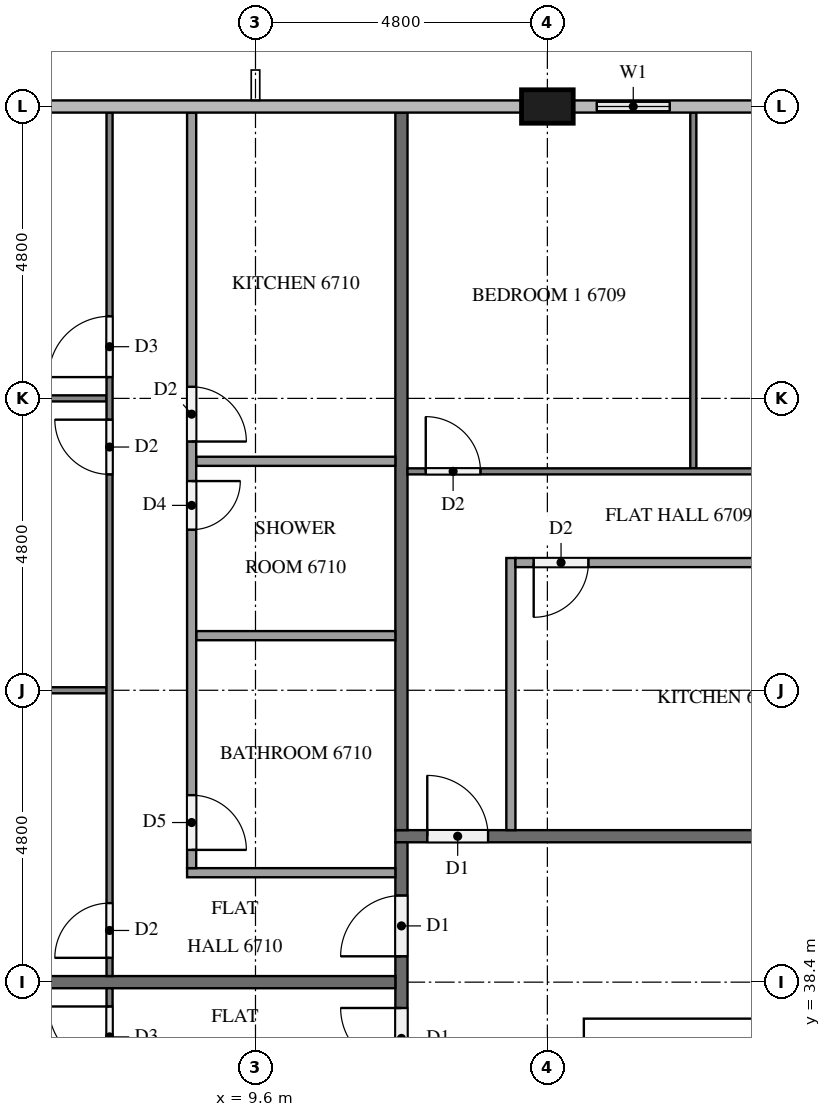
"""IFC4 building model, lengths in metres.
Left out: names, types, materials, properties, quantities, classifications, styles, units other than length and angle.
Written with IfcOpenShell. Run it as: python <this file> out.ifc"""

import sys

from ifc_helpers import new_model, si_unit, direction, frame, frame_2d, origin, origin_2d, place, context, subcontext, project, spatial, rectangle, extrude, element, fill, save


model = new_model("IFC4")
c1 = context("Model", 3, precision=1e-05, world=origin(), true_north=direction((0.0, 1.0)))
c2 = subcontext(c1, "Body", "Model", "MODEL_VIEW")
j1 = project(units=[si_unit("LENGTHUNIT", "METRE"), si_unit("PLANEANGLEUNIT", "RADIAN")], contexts=[c1])
p1 = place(None, origin())
s1 = spatial("IfcSite", under=j1, at=p1, CompositionType="ELEMENT")
p2 = place(p1, origin())
s2 = spatial("IfcBuilding", under=s1, at=p2, CompositionType="ELEMENT")
p3 = place(p2, frame((0.0, 0.0, 256.2)))
s3 = spatial("IfcBuildingStorey", under=s2, at=p3, CompositionType="ELEMENT", Elevation=256.2)
p4 = place(p3, frame((15.0, 37.5, 0.0), z_axis=(0.0, 0.0, 1.0), x_axis=(1.0, 0.0, 0.0)))
e1 = element("IfcWall", 1, at=p4, inside=s3, PredefinedType="SHEAR", context=c2, shape_type="SweptSolid", body=[
    extrude(rectangle(XDim=32.4, YDim=0.6, at=frame_2d((16.2, 0.0))), origin(), (0.0, 0.0, 1.0), 3.2),
])
p5 = place(p4, frame((15.3, 0.0, 0.0)))
e2 = element("IfcOpeningElement", 2, at=p5, cuts=e1, PredefinedType="OPENING", context=c2, shape_type="SweptSolid", body=[
    extrude(rectangle(XDim=1.8, YDim=2.1, at=frame_2d((0.9, 1.05))), frame((0.0, 0.31, 0.0), z_axis=(0.0, -1.0, 0.0), x_axis=(1.0, 0.0, 0.0)), (0.0, 0.0, 1.0), 0.62),
])
p6 = place(p4, frame((1.25, 0.0, 0.0)))
e3 = element("IfcOpeningElement", 3, at=p6, cuts=e1, PredefinedType="OPENING", context=c2, shape_type="SweptSolid", body=[
    extrude(rectangle(XDim=1.0, YDim=2.1, at=frame_2d((0.5, 1.05))), frame((0.0, 0.31, 0.0), z_axis=(0.0, -1.0, 0.0), x_axis=(1.0, 0.0, 0.0)), (0.0, 0.0, 1.0), 0.62),
])
p7 = place(p4, frame((4.988, 0.0, 0.0)))
e4 = element("IfcOpeningElement", 4, at=p7, cuts=e1, PredefinedType="OPENING", context=c2, shape_type="SweptSolid", body=[
    extrude(rectangle(XDim=1.0, YDim=2.1, at=frame_2d((0.5, 1.05))), frame((0.0, 0.31, 0.0), z_axis=(0.0, -1.0, 0.0), x_axis=(1.0, 0.0, 0.0)), (0.0, 0.0, 1.0), 0.62),
])
p8 = place(p3, frame((14.4, 52.8, 0.0), z_axis=(0.0, 0.0, 1.0), x_axis=(1.0, 0.0, 0.0)))
e5 = element("IfcColumn", 5, at=p8, inside=s3, PredefinedType="COLUMN", context=c2, shape_type="SweptSolid", body=[
    extrude(rectangle(XDim=0.85, YDim=0.55, at=origin_2d()), origin(), (0.0, 0.0, 1.0), 3.2),
])
p9 = place(p3, frame((16.8, 52.8, 0.0), z_axis=(0.0, 0.0, 1.0), x_axis=(-1.0, 0.0, 0.0)))
e6 = element("IfcWall", 6, at=p9, inside=s3, PredefinedType="SOLIDWALL", context=c2, shape_type="SweptSolid", body=[
    extrude(rectangle(XDim=1.975, YDim=0.15, at=frame_2d((0.988, 0.0))), origin(), (0.0, 0.0, 1.0), 3.2),
])
p10 = place(p9, frame((0.387, 0.0, 0.9)))
e7 = element("IfcOpeningElement", 7, at=p10, cuts=e6, PredefinedType="OPENING", context=c2, shape_type="SweptSolid", body=[
    extrude(rectangle(XDim=1.2, YDim=1.4, at=frame_2d((0.6, 0.7))), frame((0.0, 0.085, 0.0), z_axis=(0.0, -1.0, 0.0), x_axis=(1.0, 0.0, 0.0)), (0.0, 0.0, 1.0), 0.17),
])
p11 = place(p3, frame((11.9, 40.8, 0.0), z_axis=(0.0, 0.0, 1.0), x_axis=(1.0, 0.0, 0.0)))
e8 = element("IfcWall", 8, at=p11, inside=s3, PredefinedType="PARTITIONING", context=c2, shape_type="SweptSolid", body=[
    extrude(rectangle(XDim=38.6, YDim=0.2, at=frame_2d((19.3, 0.0))), origin(), (0.0, 0.0, 1.0), 3.2),
])
p12 = place(p11, frame((31.725, 0.0, 0.0)))
e9 = element("IfcOpeningElement", 9, at=p12, cuts=e8, PredefinedType="OPENING", context=c2, shape_type="SweptSolid", body=[
    extrude(rectangle(XDim=1.0, YDim=2.1, at=frame_2d((0.5, 1.05))), frame((0.0, 0.11, 0.0), z_axis=(0.0, -1.0, 0.0), x_axis=(1.0, 0.0, 0.0)), (0.0, 0.0, 1.0), 0.22),
])
p13 = place(p11, frame((17.325, 0.0, 0.0)))
e10 = element("IfcOpeningElement", 10, at=p13, cuts=e8, PredefinedType="OPENING", context=c2, shape_type="SweptSolid", body=[
    extrude(rectangle(XDim=1.0, YDim=2.1, at=frame_2d((0.5, 1.05))), frame((0.0, 0.11, 0.0), z_axis=(0.0, -1.0, 0.0), x_axis=(1.0, 0.0, 0.0)), (0.0, 0.0, 1.0), 0.22),
])
p14 = place(p11, frame((0.525, 0.0, 0.0)))
e11 = element("IfcOpeningElement", 11, at=p14, cuts=e8, PredefinedType="OPENING", context=c2, shape_type="SweptSolid", body=[
    extrude(rectangle(XDim=1.0, YDim=2.1, at=frame_2d((0.5, 1.05))), frame((0.0, 0.11, 0.0), z_axis=(0.0, -1.0, 0.0), x_axis=(1.0, 0.0, 0.0)), (0.0, 0.0, 1.0), 0.22),
])
p15 = place(p3, frame((12.0, 12.1, 0.0), z_axis=(0.0, 0.0, 1.0), x_axis=(0.0, 1.0, 0.0)))
e12 = element("IfcWall", 12, at=p15, inside=s3, PredefinedType="PARTITIONING", context=c2, shape_type="SweptSolid", body=[
    extrude(rectangle(XDim=28.6, YDim=0.2, at=frame_2d((14.3, 0.0))), origin(), (0.0, 0.0, 1.0), 3.2),
])
p16 = place(p15, frame((26.725, 0.0, 0.0)))
e13 = element("IfcOpeningElement", 13, at=p16, cuts=e12, PredefinedType="OPENING", context=c2, shape_type="SweptSolid", body=[
    extrude(rectangle(XDim=1.0, YDim=2.1, at=frame_2d((0.5, 1.05))), frame((0.0, 0.11, 0.0), z_axis=(0.0, -1.0, 0.0), x_axis=(1.0, 0.0, 0.0)), (0.0, 0.0, 1.0), 0.22),
])
p17 = place(p15, frame((24.875, 0.0, 0.0)))
e14 = element("IfcOpeningElement", 14, at=p17, cuts=e12, PredefinedType="OPENING", context=c2, shape_type="SweptSolid", body=[
    extrude(rectangle(XDim=1.0, YDim=2.1, at=frame_2d((0.5, 1.05))), frame((0.0, 0.11, 0.0), z_axis=(0.0, -1.0, 0.0), x_axis=(1.0, 0.0, 0.0)), (0.0, 0.0, 1.0), 0.22),
])
p18 = place(p15, frame((17.675, 0.0, 0.0)))
e15 = element("IfcOpeningElement", 15, at=p18, cuts=e12, PredefinedType="OPENING", context=c2, shape_type="SweptSolid", body=[
    extrude(rectangle(XDim=1.0, YDim=2.1, at=frame_2d((0.5, 1.05))), frame((0.0, 0.11, 0.0), z_axis=(0.0, -1.0, 0.0), x_axis=(1.0, 0.0, 0.0)), (0.0, 0.0, 1.0), 0.22),
])
p19 = place(p15, frame((2.725, 0.0, 0.0)))
e16 = element("IfcOpeningElement", 16, at=p19, cuts=e12, PredefinedType="OPENING", context=c2, shape_type="SweptSolid", body=[
    extrude(rectangle(XDim=1.0, YDim=2.1, at=frame_2d((0.5, 1.05))), frame((0.0, 0.11, 0.0), z_axis=(0.0, -1.0, 0.0), x_axis=(1.0, 0.0, 0.0)), (0.0, 0.0, 1.0), 0.22),
])
p20 = place(p15, frame((0.875, 0.0, 0.0)))
e17 = element("IfcOpeningElement", 17, at=p20, cuts=e12, PredefinedType="OPENING", context=c2, shape_type="SweptSolid", body=[
    extrude(rectangle(XDim=1.0, YDim=2.1, at=frame_2d((0.5, 1.05))), frame((0.0, 0.11, 0.0), z_axis=(0.0, -1.0, 0.0), x_axis=(1.0, 0.0, 0.0)), (0.0, 0.0, 1.0), 0.22),
])
p21 = place(p3, frame((12.0, 52.7, 0.0), z_axis=(0.0, 0.0, 1.0), x_axis=(0.0, -1.0, 0.0)))
e18 = element("IfcWall", 18, at=p21, inside=s3, PredefinedType="PARTITIONING", context=c2, shape_type="SweptSolid", body=[
    extrude(rectangle(XDim=11.8, YDim=0.2, at=frame_2d((5.9, 0.0))), origin(), (0.0, 0.0, 1.0), 3.2),
])
p22 = place(p3, frame((0.275, 38.4, 0.0), z_axis=(0.0, 0.0, 1.0), x_axis=(1.0, 0.0, 0.0)))
e19 = element("IfcWall", 19, at=p22, inside=s3, PredefinedType="PARTITIONING", context=c2, shape_type="SweptSolid", body=[
    extrude(rectangle(XDim=11.625, YDim=0.2, at=frame_2d((5.812, 0.0))), origin(), (0.0, 0.0, 1.0), 3.2),
])
p23 = place(p3, frame((16.8, 46.85, 0.0), z_axis=(0.0, 0.0, 1.0), x_axis=(0.0, 1.0, 0.0)))
e20 = element("IfcWall", 20, at=p23, inside=s3, PredefinedType="PARTITIONING", context=c2, shape_type="SweptSolid", body=[
    extrude(rectangle(XDim=5.85, YDim=0.1, at=frame_2d((2.925, 0.0))), origin(), (0.0, 0.0, 1.0), 3.2),
])
p24 = place(p3, frame((12.1, 46.8, 0.0), z_axis=(0.0, 0.0, 1.0), x_axis=(1.0, 0.0, 0.0)))
e21 = element("IfcWall", 21, at=p24, inside=s3, PredefinedType="PARTITIONING", context=c2, shape_type="SweptSolid", body=[
    extrude(rectangle(XDim=16.6, YDim=0.1, at=frame_2d((8.3, 0.0))), origin(), (0.0, 0.0, 1.0), 3.2),
])
p25 = place(p24, frame((0.3, 0.0, 0.0)))
e22 = element("IfcOpeningElement", 22, at=p25, cuts=e21, PredefinedType="OPENING", context=c2, shape_type="SweptSolid", body=[
    extrude(rectangle(XDim=0.9, YDim=2.1, at=frame_2d((0.45, 1.05))), frame((0.0, 0.06, 0.0), z_axis=(0.0, -1.0, 0.0), x_axis=(1.0, 0.0, 0.0)), (0.0, 0.0, 1.0), 0.12),
])
p26 = place(p24, frame((8.25, 0.0, 0.0)))
e23 = element("IfcOpeningElement", 23, at=p26, cuts=e21, PredefinedType="OPENING", context=c2, shape_type="SweptSolid", body=[
    extrude(rectangle(XDim=0.9, YDim=2.1, at=frame_2d((0.45, 1.05))), frame((0.0, 0.06, 0.0), z_axis=(0.0, -1.0, 0.0), x_axis=(1.0, 0.0, 0.0)), (0.0, 0.0, 1.0), 0.12),
])
p27 = place(p24, frame((9.85, 0.0, 0.0)))
e24 = element("IfcOpeningElement", 24, at=p27, cuts=e21, PredefinedType="OPENING", context=c2, shape_type="SweptSolid", body=[
    extrude(rectangle(XDim=1.0, YDim=2.1, at=frame_2d((0.5, 1.05))), frame((0.0, 0.06, 0.0), z_axis=(0.0, -1.0, 0.0), x_axis=(1.0, 0.0, 0.0)), (0.0, 0.0, 1.0), 0.12),
])
p28 = place(p3, frame((13.8, 40.9, 0.0), z_axis=(0.0, 0.0, 1.0), x_axis=(0.0, 1.0, 0.0)))
e25 = element("IfcWall", 25, at=p28, inside=s3, PredefinedType="PARTITIONING", context=c2, shape_type="SweptSolid", body=[
    extrude(rectangle(XDim=4.475, YDim=0.15, at=frame_2d((2.238, 0.0))), origin(), (0.0, 0.0, 1.0), 3.2),
])
p29 = place(p3, frame((28.7, 45.3, 0.0), z_axis=(0.0, 0.0, 1.0), x_axis=(-1.0, 0.0, 0.0)))
e26 = element("IfcWall", 26, at=p29, inside=s3, PredefinedType="PARTITIONING", context=c2, shape_type="SweptSolid", body=[
    extrude(rectangle(XDim=14.825, YDim=0.15, at=frame_2d((7.413, 0.0))), origin(), (0.0, 0.0, 1.0), 3.2),
])
p30 = place(p29, frame((13.625, 0.0, 0.0)))
e27 = element("IfcOpeningElement", 27, at=p30, cuts=e26, PredefinedType="OPENING", context=c2, shape_type="SweptSolid", body=[
    extrude(rectangle(XDim=0.9, YDim=2.1, at=frame_2d((0.45, 1.05))), frame((0.0, 0.085, 0.0), z_axis=(0.0, -1.0, 0.0), x_axis=(1.0, 0.0, 0.0)), (0.0, 0.0, 1.0), 0.17),
])
p31 = place(p29, frame((4.886, 0.0, 0.0)))
e28 = element("IfcOpeningElement", 28, at=p31, cuts=e26, PredefinedType="OPENING", context=c2, shape_type="SweptSolid", body=[
    extrude(rectangle(XDim=0.8, YDim=2.1, at=frame_2d((0.4, 1.05))), frame((0.0, 0.085, 0.0), z_axis=(0.0, -1.0, 0.0), x_axis=(1.0, 0.0, 0.0)), (0.0, 0.0, 1.0), 0.17),
])
p32 = place(p29, frame((3.336, 0.0, 0.0)))
e29 = element("IfcOpeningElement", 29, at=p32, cuts=e26, PredefinedType="OPENING", context=c2, shape_type="SweptSolid", body=[
    extrude(rectangle(XDim=0.9, YDim=2.1, at=frame_2d((0.45, 1.05))), frame((0.0, 0.085, 0.0), z_axis=(0.0, -1.0, 0.0), x_axis=(1.0, 0.0, 0.0)), (0.0, 0.0, 1.0), 0.17),
])
p33 = place(p3, frame((7.15, 43.2, 0.0), z_axis=(0.0, 0.0, 1.0), x_axis=(-1.0, 0.0, 0.0)))
e30 = element("IfcWall", 30, at=p33, inside=s3, PredefinedType="PARTITIONING", context=c2, shape_type="SweptSolid", body=[
    extrude(rectangle(XDim=7.05, YDim=0.1, at=frame_2d((3.525, 0.0))), origin(), (0.0, 0.0, 1.0), 3.2),
])
p34 = place(p3, frame((7.15, 48.0, 0.0), z_axis=(0.0, 0.0, 1.0), x_axis=(-1.0, 0.0, 0.0)))
e31 = element("IfcWall", 31, at=p34, inside=s3, PredefinedType="PARTITIONING", context=c2, shape_type="SweptSolid", body=[
    extrude(rectangle(XDim=6.8, YDim=0.1, at=frame_2d((3.4, 0.0))), origin(), (0.0, 0.0, 1.0), 3.2),
])
p35 = place(p3, frame((7.2, 38.5, 0.0), z_axis=(0.0, 0.0, 1.0), x_axis=(0.0, 1.0, 0.0)))
e32 = element("IfcWall", 32, at=p35, inside=s3, PredefinedType="PARTITIONING", context=c2, shape_type="SweptSolid", body=[
    extrude(rectangle(XDim=14.2, YDim=0.1, at=frame_2d((7.1, 0.0))), origin(), (0.0, 0.0, 1.0), 3.2),
])
p36 = place(p35, frame((0.3, 0.0, 0.0)))
e33 = element("IfcOpeningElement", 33, at=p36, cuts=e32, PredefinedType="OPENING", context=c2, shape_type="SweptSolid", body=[
    extrude(rectangle(XDim=0.9, YDim=2.1, at=frame_2d((0.45, 1.05))), frame((0.0, 0.06, 0.0), z_axis=(0.0, -1.0, 0.0), x_axis=(1.0, 0.0, 0.0)), (0.0, 0.0, 1.0), 0.12),
])
p37 = place(p35, frame((8.25, 0.0, 0.0)))
e34 = element("IfcOpeningElement", 34, at=p37, cuts=e32, PredefinedType="OPENING", context=c2, shape_type="SweptSolid", body=[
    extrude(rectangle(XDim=0.9, YDim=2.1, at=frame_2d((0.45, 1.05))), frame((0.0, 0.06, 0.0), z_axis=(0.0, -1.0, 0.0), x_axis=(1.0, 0.0, 0.0)), (0.0, 0.0, 1.0), 0.12),
])
p38 = place(p35, frame((9.85, 0.0, 0.0)))
e35 = element("IfcOpeningElement", 35, at=p38, cuts=e32, PredefinedType="OPENING", context=c2, shape_type="SweptSolid", body=[
    extrude(rectangle(XDim=1.0, YDim=2.1, at=frame_2d((0.5, 1.05))), frame((0.0, 0.06, 0.0), z_axis=(0.0, -1.0, 0.0), x_axis=(1.0, 0.0, 0.0)), (0.0, 0.0, 1.0), 0.12),
])
for number, where, z_axis, x_axis in (
    (36, (11.9, 44.098, 0.0), (0.0, 0.0, 1.0), (-1.0, 0.0, 0.0)),
    (37, (11.9, 46.965, 0.0), (0.0, 0.0, 1.0), (-1.0, 0.0, 0.0)),
):
    element("IfcWall", number, at=place(p3, frame(where, z_axis=z_axis, x_axis=x_axis)), inside=s3, PredefinedType="PARTITIONING", context=c2, shape_type="SweptSolid", body=[
        extrude(rectangle(XDim=3.275, YDim=0.15, at=frame_2d((1.637, 0.0))), origin(), (0.0, 0.0, 1.0), 3.2),
    ])
p39 = place(p3, frame((11.9, 40.2, 0.0), z_axis=(0.0, 0.0, 1.0), x_axis=(-1.0, 0.0, 0.0)))
e38 = element("IfcWall", 38, at=p39, inside=s3, PredefinedType="PARTITIONING", context=c2, shape_type="SweptSolid", body=[
    extrude(rectangle(XDim=3.425, YDim=0.15, at=frame_2d((1.712, 0.0))), origin(), (0.0, 0.0, 1.0), 3.2),
])
p40 = place(p3, frame((8.55, 52.7, 0.0), z_axis=(0.0, 0.0, 1.0), x_axis=(0.0, -1.0, 0.0)))
e39 = element("IfcWall", 39, at=p40, inside=s3, PredefinedType="PARTITIONING", context=c2, shape_type="SweptSolid", body=[
    extrude(rectangle(XDim=12.425, YDim=0.15, at=frame_2d((6.212, 0.0))), origin(), (0.0, 0.0, 1.0), 3.2),
])
p41 = place(p40, frame((11.225, 0.0, 0.0)))
e40 = element("IfcOpeningElement", 40, at=p41, cuts=e39, PredefinedType="OPENING", context=c2, shape_type="SweptSolid", body=[
    extrude(rectangle(XDim=0.9, YDim=2.1, at=frame_2d((0.45, 1.05))), frame((0.0, 0.085, 0.0), z_axis=(0.0, -1.0, 0.0), x_axis=(1.0, 0.0, 0.0)), (0.0, 0.0, 1.0), 0.17),
])
p42 = place(p40, frame((6.06, 0.0, 0.0)))
e41 = element("IfcOpeningElement", 41, at=p42, cuts=e39, PredefinedType="OPENING", context=c2, shape_type="SweptSolid", body=[
    extrude(rectangle(XDim=0.8, YDim=2.1, at=frame_2d((0.4, 1.05))), frame((0.0, 0.085, 0.0), z_axis=(0.0, -1.0, 0.0), x_axis=(1.0, 0.0, 0.0)), (0.0, 0.0, 1.0), 0.17),
])
p43 = place(p40, frame((4.51, 0.0, 0.0)))
e42 = element("IfcOpeningElement", 42, at=p43, cuts=e39, PredefinedType="OPENING", context=c2, shape_type="SweptSolid", body=[
    extrude(rectangle(XDim=0.9, YDim=2.1, at=frame_2d((0.45, 1.05))), frame((0.0, 0.085, 0.0), z_axis=(0.0, -1.0, 0.0), x_axis=(1.0, 0.0, 0.0)), (0.0, 0.0, 1.0), 0.17),
])
p44 = place(p3, frame((7.2, 31.3, 0.0), z_axis=(0.0, 0.0, 1.0), x_axis=(0.0, 1.0, 0.0)))
e43 = element("IfcWall", 43, at=p44, inside=s3, PredefinedType="PARTITIONING", context=c2, shape_type="SweptSolid", body=[
    extrude(rectangle(XDim=7.0, YDim=0.1, at=frame_2d((3.5, 0.0))), origin(), (0.0, 0.0, 1.0), 3.2),
])
p45 = place(p44, frame((5.7, 0.0, 0.0)))
e44 = element("IfcOpeningElement", 44, at=p45, cuts=e43, PredefinedType="OPENING", context=c2, shape_type="SweptSolid", body=[
    extrude(rectangle(XDim=1.0, YDim=2.1, at=frame_2d((0.5, 1.05))), frame((0.0, 0.06, 0.0), z_axis=(0.0, -1.0, 0.0), x_axis=(1.0, 0.0, 0.0)), (0.0, 0.0, 1.0), 0.12),
])
p46 = place(p10, origin())
e45 = element("IfcWindow", 45, at=p46, inside=s3, PartitioningType="SINGLE_PANEL", PredefinedType="WINDOW", context=c2, shape_type="SweptSolid", body=[
    extrude(rectangle(XDim=1.2, YDim=1.4, at=frame_2d((0.6, 0.7))), frame((0.0, 0.03, 0.0), z_axis=(0.0, -1.0, 0.0), x_axis=(1.0, 0.0, 0.0)), (0.0, 0.0, 1.0), 0.06),
])
fill(e7, e45)
p47 = place(p6, origin())
e46 = element("IfcDoor", 46, at=p47, inside=s3, OperationType="SINGLE_SWING_RIGHT", PredefinedType="DOOR", context=c2, shape_type="SweptSolid", body=[
    extrude(rectangle(XDim=1.0, YDim=2.1, at=frame_2d((0.5, 1.05))), frame((0.0, 0.025, 0.0), z_axis=(0.0, -1.0, 0.0), x_axis=(1.0, 0.0, 0.0)), (0.0, 0.0, 1.0), 0.05),
])
fill(e3, e46)
p48 = place(p14, origin())
e47 = element("IfcDoor", 47, at=p48, inside=s3, OperationType="SINGLE_SWING_LEFT", PredefinedType="DOOR", context=c2, shape_type="SweptSolid", body=[
    extrude(rectangle(XDim=1.0, YDim=2.1, at=frame_2d((0.5, 1.05))), frame((0.0, 0.025, 0.0), z_axis=(0.0, -1.0, 0.0), x_axis=(1.0, 0.0, 0.0)), (0.0, 0.0, 1.0), 0.05),
])
fill(e11, e47)
p49 = place(p16, origin())
e48 = element("IfcDoor", 48, at=p49, inside=s3, OperationType="SINGLE_SWING_LEFT", PredefinedType="DOOR", context=c2, shape_type="SweptSolid", body=[
    extrude(rectangle(XDim=1.0, YDim=2.1, at=frame_2d((0.5, 1.05))), frame((0.0, 0.025, 0.0), z_axis=(0.0, -1.0, 0.0), x_axis=(1.0, 0.0, 0.0)), (0.0, 0.0, 1.0), 0.05),
])
fill(e13, e48)
p50 = place(p17, origin())
e49 = element("IfcDoor", 49, at=p50, inside=s3, OperationType="SINGLE_SWING_RIGHT", PredefinedType="DOOR", context=c2, shape_type="SweptSolid", body=[
    extrude(rectangle(XDim=1.0, YDim=2.1, at=frame_2d((0.5, 1.05))), frame((0.0, 0.025, 0.0), z_axis=(0.0, -1.0, 0.0), x_axis=(1.0, 0.0, 0.0)), (0.0, 0.0, 1.0), 0.05),
])
fill(e14, e49)
p51 = place(p25, origin())
e50 = element("IfcDoor", 50, at=p51, inside=s3, OperationType="SINGLE_SWING_LEFT", PredefinedType="DOOR", context=c2, shape_type="SweptSolid", body=[
    extrude(rectangle(XDim=0.9, YDim=2.1, at=frame_2d((0.45, 1.05))), frame((0.0, 0.025, 0.0), z_axis=(0.0, -1.0, 0.0), x_axis=(1.0, 0.0, 0.0)), (0.0, 0.0, 1.0), 0.05),
])
fill(e22, e50)
p52 = place(p30, origin())
e51 = element("IfcDoor", 51, at=p52, inside=s3, OperationType="SINGLE_SWING_RIGHT", PredefinedType="DOOR", context=c2, shape_type="SweptSolid", body=[
    extrude(rectangle(XDim=0.9, YDim=2.1, at=frame_2d((0.45, 1.05))), frame((0.0, 0.025, 0.0), z_axis=(0.0, -1.0, 0.0), x_axis=(1.0, 0.0, 0.0)), (0.0, 0.0, 1.0), 0.05),
])
fill(e27, e51)
p53 = place(p36, origin())
e52 = element("IfcDoor", 52, at=p53, inside=s3, OperationType="SINGLE_SWING_LEFT", PredefinedType="DOOR", context=c2, shape_type="SweptSolid", body=[
    extrude(rectangle(XDim=0.9, YDim=2.1, at=frame_2d((0.45, 1.05))), frame((0.0, 0.025, 0.0), z_axis=(0.0, -1.0, 0.0), x_axis=(1.0, 0.0, 0.0)), (0.0, 0.0, 1.0), 0.05),
])
fill(e33, e52)
p54 = place(p37, origin())
e53 = element("IfcDoor", 53, at=p54, inside=s3, OperationType="SINGLE_SWING_RIGHT", PredefinedType="DOOR", context=c2, shape_type="SweptSolid", body=[
    extrude(rectangle(XDim=0.9, YDim=2.1, at=frame_2d((0.45, 1.05))), frame((0.0, 0.025, 0.0), z_axis=(0.0, -1.0, 0.0), x_axis=(1.0, 0.0, 0.0)), (0.0, 0.0, 1.0), 0.05),
])
fill(e34, e53)
p55 = place(p38, origin())
e54 = element("IfcDoor", 54, at=p55, inside=s3, OperationType="SINGLE_SWING_LEFT", PredefinedType="DOOR", context=c2, shape_type="SweptSolid", body=[
    extrude(rectangle(XDim=1.0, YDim=2.1, at=frame_2d((0.5, 1.05))), frame((0.0, 0.025, 0.0), z_axis=(0.0, -1.0, 0.0), x_axis=(1.0, 0.0, 0.0)), (0.0, 0.0, 1.0), 0.05),
])
fill(e35, e54)
p56 = place(p41, origin())
e55 = element("IfcDoor", 55, at=p56, inside=s3, OperationType="SINGLE_SWING_RIGHT", PredefinedType="DOOR", context=c2, shape_type="SweptSolid", body=[
    extrude(rectangle(XDim=0.9, YDim=2.1, at=frame_2d((0.45, 1.05))), frame((0.0, 0.025, 0.0), z_axis=(0.0, -1.0, 0.0), x_axis=(1.0, 0.0, 0.0)), (0.0, 0.0, 1.0), 0.05),
])
fill(e40, e55)
p57 = place(p42, origin())
e56 = element("IfcDoor", 56, at=p57, inside=s3, OperationType="SINGLE_SWING_LEFT", PredefinedType="DOOR", context=c2, shape_type="SweptSolid", body=[
    extrude(rectangle(XDim=0.8, YDim=2.1, at=frame_2d((0.4, 1.05))), frame((0.0, 0.025, 0.0), z_axis=(0.0, -1.0, 0.0), x_axis=(1.0, 0.0, 0.0)), (0.0, 0.0, 1.0), 0.05),
])
fill(e41, e56)
p58 = place(p43, origin())
e57 = element("IfcDoor", 57, at=p58, inside=s3, OperationType="SINGLE_SWING_RIGHT", PredefinedType="DOOR", context=c2, shape_type="SweptSolid", body=[
    extrude(rectangle(XDim=0.9, YDim=2.1, at=frame_2d((0.45, 1.05))), frame((0.0, 0.025, 0.0), z_axis=(0.0, -1.0, 0.0), x_axis=(1.0, 0.0, 0.0)), (0.0, 0.0, 1.0), 0.05),
])
fill(e42, e57)
p59 = place(p45, origin())
e58 = element("IfcDoor", 58, at=p59, inside=s3, OperationType="SINGLE_SWING_RIGHT", PredefinedType="DOOR", context=c2, shape_type="SweptSolid", body=[
    extrude(rectangle(XDim=1.0, YDim=2.1, at=frame_2d((0.5, 1.05))), frame((0.0, 0.025, 0.0), z_axis=(0.0, -1.0, 0.0), x_axis=(1.0, 0.0, 0.0)), (0.0, 0.0, 1.0), 0.05),
])
fill(e44, e58)
save(model, sys.argv[1])
